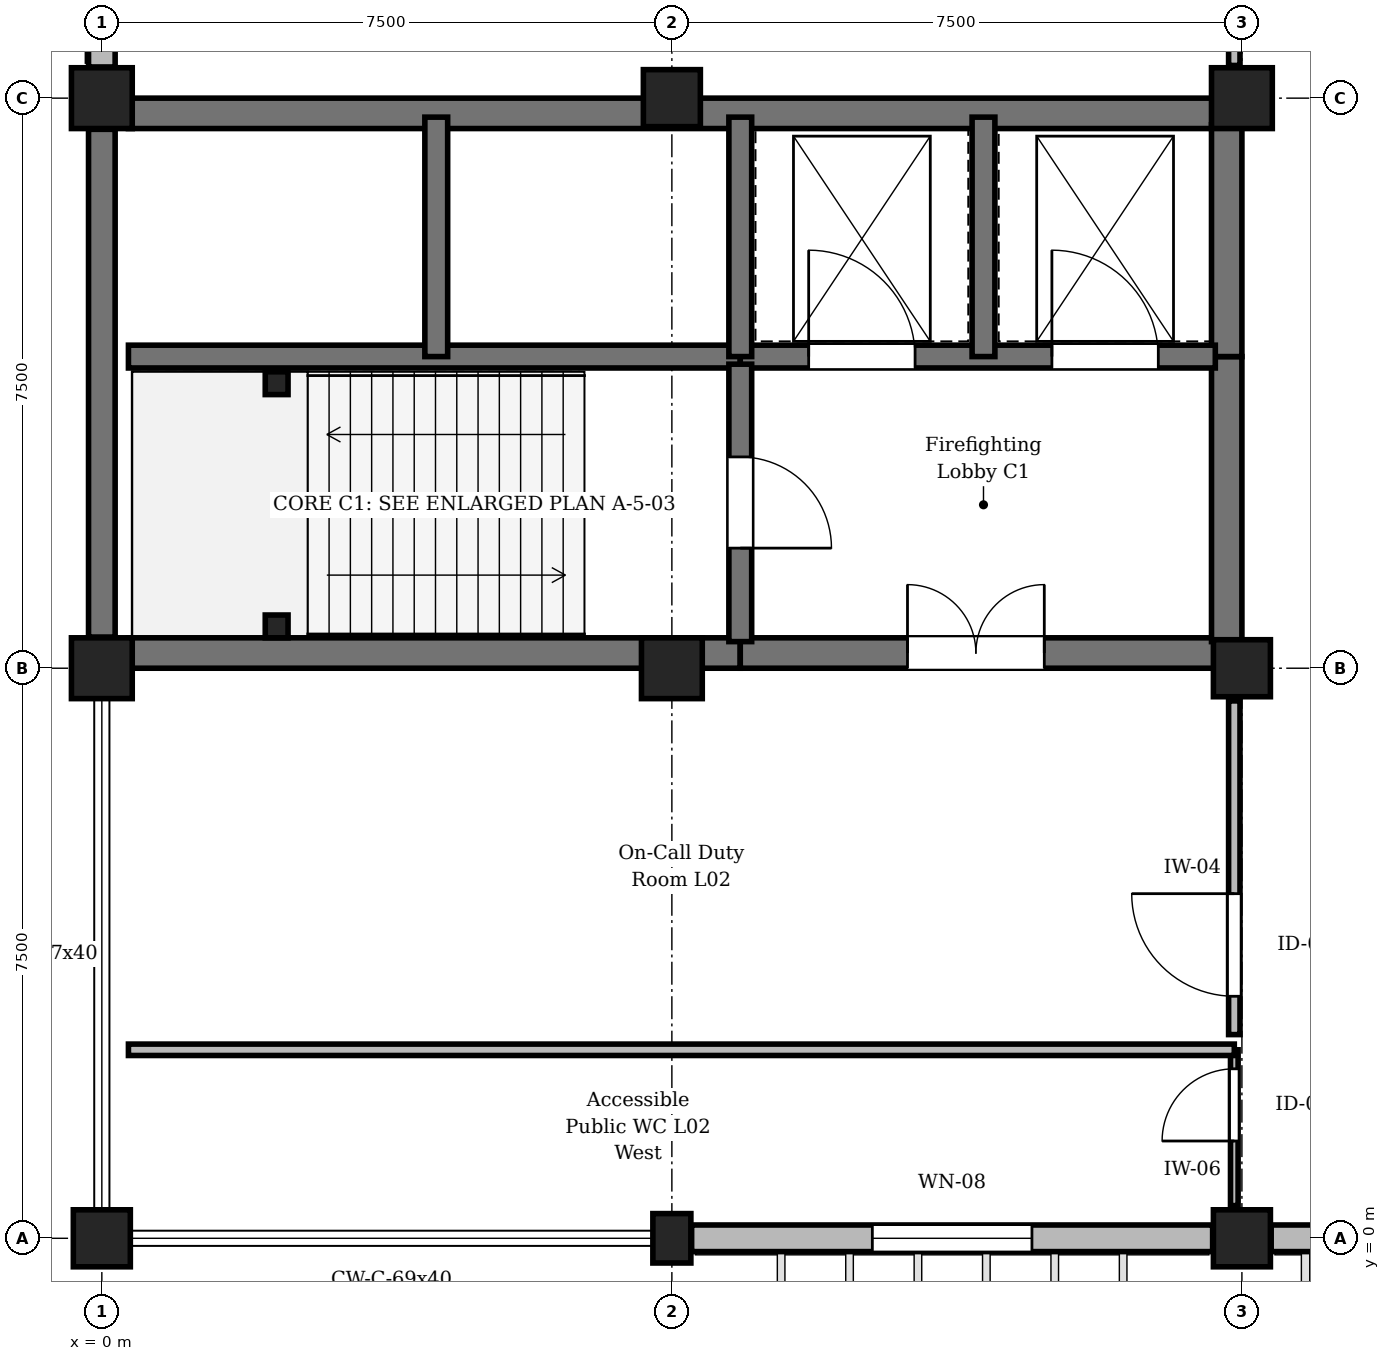
"""IFC4 building model, lengths in metres.
Left out: names, types, materials, properties, quantities, classifications, styles, units other than length and angle.
Written with IfcOpenShell. Run it as: python <this file> out.ifc"""

import sys

from ifc_helpers import new_model, si_unit, direction, frame, frame_2d, origin, origin_with_axes, origin_2d, place, context, subcontext, project, spatial, rectangle, circle, i_section, extrude, element, fill, save


model = new_model("IFC4")
c1 = context("Model", 3, precision=1e-05, world=origin(), true_north=direction((0.0, 1.0)))
c2 = subcontext(c1, "Body", "Model", "MODEL_VIEW")
j1 = project(units=[si_unit("LENGTHUNIT", "METRE"), si_unit("PLANEANGLEUNIT", "RADIAN")], contexts=[c1])
p1 = place(None, origin())
s1 = spatial("IfcSite", under=j1, at=p1, CompositionType="ELEMENT")
p2 = place(p1, origin())
s2 = spatial("IfcBuilding", under=s1, at=p2, CompositionType="ELEMENT")
p3 = place(p2, frame((0.0, 0.0, 9.3)))
s3 = spatial("IfcBuildingStorey", under=s2, at=p3, CompositionType="ELEMENT", Elevation=9.3)
p4 = place(p3, origin_with_axes())
e1 = element("IfcColumn", 1, at=p4, inside=s3, PredefinedType="COLUMN", context=c2, shape_type="SweptSolid", body=[
    extrude(rectangle(XDim=0.75, YDim=0.75, at=origin_2d()), origin(), (0.0, 0.0, 1.0), 4.8),
])
for number, where, z_axis, x_axis in (
    (2, (0.0, 7.5, 0.0), (0.0, 0.0, 1.0), (1.0, 0.0, 0.0)),
    (3, (0.0, 15.0, 0.0), (0.0, 0.0, 1.0), (1.0, 0.0, 0.0)),
):
    element("IfcColumn", number, at=place(p3, frame(where, z_axis=z_axis, x_axis=x_axis)), inside=s3, PredefinedType="COLUMN", context=c2, shape_type="SweptSolid", body=[
        extrude(rectangle(XDim=0.8, YDim=0.8, at=origin_2d()), origin(), (0.0, 0.0, 1.0), 4.8),
    ])
p5 = place(p3, frame((7.5, 0.0, 0.0), z_axis=(0.0, 0.0, 1.0), x_axis=(1.0, 0.0, 0.0)))
e4 = element("IfcColumn", 4, at=p5, inside=s3, PredefinedType="COLUMN", context=c2, shape_type="SweptSolid", body=[
    extrude(rectangle(XDim=0.5, YDim=0.65, at=origin_2d()), origin(), (0.0, 0.0, 1.0), 4.8),
])
p6 = place(p3, frame((7.5, 7.5, 0.0), z_axis=(0.0, 0.0, 1.0), x_axis=(1.0, 0.0, 0.0)))
e5 = element("IfcColumn", 5, at=p6, inside=s3, PredefinedType="COLUMN", context=c2, shape_type="SweptSolid", body=[
    extrude(rectangle(XDim=0.8, YDim=0.8, at=origin_2d()), origin(), (0.0, 0.0, 1.0), 4.8),
])
p7 = place(p3, frame((7.5, 15.0, 0.0), z_axis=(0.0, 0.0, 1.0), x_axis=(1.0, 0.0, 0.0)))
e6 = element("IfcColumn", 6, at=p7, inside=s3, PredefinedType="COLUMN", context=c2, shape_type="SweptSolid", body=[
    extrude(circle(Radius=0.375, at=origin_2d()), origin(), (0.0, 0.0, 1.0), 4.8),
])
p8 = place(p3, frame((15.0, 0.0, 0.0), z_axis=(0.0, 0.0, 1.0), x_axis=(1.0, 0.0, 0.0)))
e7 = element("IfcColumn", 7, at=p8, inside=s3, PredefinedType="COLUMN", context=c2, shape_type="SweptSolid", body=[
    extrude(rectangle(XDim=0.75, YDim=0.75, at=origin_2d()), origin(), (0.0, 0.0, 1.0), 4.8),
])
p9 = place(p3, frame((15.0, 7.5, 0.0), z_axis=(0.0, 0.0, 1.0), x_axis=(1.0, 0.0, 0.0)))
e8 = element("IfcColumn", 8, at=p9, inside=s3, PredefinedType="COLUMN", context=c2, shape_type="SweptSolid", body=[
    extrude(circle(Radius=0.375, at=origin_2d()), origin(), (0.0, 0.0, 1.0), 4.8),
])
p10 = place(p3, frame((15.0, 15.0, 0.0), z_axis=(0.0, 0.0, 1.0), x_axis=(1.0, 0.0, 0.0)))
e9 = element("IfcColumn", 9, at=p10, inside=s3, PredefinedType="COLUMN", context=c2, shape_type="SweptSolid", body=[
    extrude(rectangle(XDim=0.8, YDim=0.8, at=origin_2d()), origin(), (0.0, 0.0, 1.0), 4.8),
])
for number, where, z_axis, x_axis in (
    (10, (2.3, 8.05, 0.0), (0.0, 0.0, 1.0), (1.0, 0.0, 0.0)),
    (11, (2.3, 11.25, 0.0), (0.0, 0.0, 1.0), (1.0, 0.0, 0.0)),
):
    element("IfcColumn", number, at=place(p3, frame(where, z_axis=z_axis, x_axis=x_axis)), inside=s3, PredefinedType="COLUMN", context=c2, shape_type="SweptSolid", body=[
        extrude(i_section(OverallWidth=0.3, OverallDepth=0.3, WebThickness=0.011, FlangeThickness=0.019, FilletRadius=0.027, at=origin_2d()), origin(), (0.0, 0.0, 1.0), 4.8),
    ])
p11 = place(p3, frame((0.0, 7.91, 0.0), z_axis=(0.0, 0.0, 1.0), x_axis=(0.0, 1.0, 0.0)))
e12 = element("IfcWall", 12, at=p11, inside=s3, PredefinedType="SHEAR", context=c2, shape_type="SweptSolid", body=[
    extrude(rectangle(XDim=6.68, YDim=0.35, at=frame_2d((3.34, 0.0))), origin(), (0.0, 0.0, 1.0), 4.55),
])
p12 = place(p3, frame((0.0, 15.41, 0.0), z_axis=(0.0, 0.0, 1.0), x_axis=(0.0, 1.0, 0.0)))
e13 = element("IfcWall", 13, at=p12, inside=s3, PredefinedType="STANDARD", context=c2, shape_type="SweptSolid", body=[
    extrude(rectangle(XDim=6.705, YDim=0.35, at=frame_2d((3.353, 0.0))), origin(), (0.0, 0.0, 1.0), 3.95),
])
p13 = place(p12, frame((2.153, 0.0, 0.9)))
e14 = element("IfcOpeningElement", 14, at=p13, cuts=e13, PredefinedType="OPENING", context=c2, shape_type="SweptSolid", body=[
    extrude(rectangle(XDim=2.4, YDim=2.1, at=frame_2d((1.2, 1.05))), frame((0.0, 0.185, 0.0), z_axis=(0.0, -1.0, 0.0), x_axis=(1.0, 0.0, 0.0)), (0.0, 0.0, 1.0), 0.37),
])
p14 = place(p3, frame((14.615, 0.0, 0.0), z_axis=(0.0, 0.0, 1.0), x_axis=(-1.0, 0.0, 0.0)))
e15 = element("IfcWall", 15, at=p14, inside=s3, PredefinedType="STANDARD", context=c2, shape_type="SweptSolid", body=[
    extrude(rectangle(XDim=6.855, YDim=0.35, at=frame_2d((3.427, 0.0))), origin(), (0.0, 0.0, 1.0), 3.95),
])
p15 = place(p14, frame((2.377, 0.0, 0.9)))
e16 = element("IfcOpeningElement", 16, at=p15, cuts=e15, PredefinedType="OPENING", context=c2, shape_type="SweptSolid", body=[
    extrude(rectangle(XDim=2.1, YDim=2.1, at=frame_2d((1.05, 1.05))), frame((0.0, 0.185, 0.0), z_axis=(0.0, -1.0, 0.0), x_axis=(1.0, 0.0, 0.0)), (0.0, 0.0, 1.0), 0.37),
])
p16 = place(p3, frame((22.24, 0.0, 0.0), z_axis=(0.0, 0.0, 1.0), x_axis=(-1.0, 0.0, 0.0)))
e17 = element("IfcWall", 17, at=p16, inside=s3, PredefinedType="STANDARD", context=c2, shape_type="SweptSolid", body=[
    extrude(rectangle(XDim=6.855, YDim=0.35, at=frame_2d((3.427, 0.0))), origin(), (0.0, 0.0, 1.0), 3.95),
])
p17 = place(p16, frame((2.228, 0.0, 0.9)))
e18 = element("IfcOpeningElement", 18, at=p17, cuts=e17, PredefinedType="OPENING", context=c2, shape_type="SweptSolid", body=[
    extrude(rectangle(XDim=2.4, YDim=2.1, at=frame_2d((1.2, 1.05))), frame((0.0, 0.185, 0.0), z_axis=(0.0, -1.0, 0.0), x_axis=(1.0, 0.0, 0.0)), (0.0, 0.0, 1.0), 0.37),
])
p18 = place(p3, frame((0.35, 7.7, 0.0), z_axis=(0.0, 0.0, 1.0), x_axis=(1.0, 0.0, 0.0)))
e19 = element("IfcWall", 19, at=p18, inside=s3, PredefinedType="SHEAR", context=c2, shape_type="SweptSolid", body=[
    extrude(rectangle(XDim=8.05, YDim=0.4, at=frame_2d((4.025, 0.0))), origin(), (0.0, 0.0, 1.0), 4.55),
])
p19 = place(p3, frame((8.4, 7.7, 0.0), z_axis=(0.0, 0.0, 1.0), x_axis=(1.0, 0.0, 0.0)))
e20 = element("IfcWall", 20, at=p19, inside=s3, PredefinedType="SHEAR", context=c2, shape_type="SweptSolid", body=[
    extrude(rectangle(XDim=6.25, YDim=0.4, at=frame_2d((3.125, 0.0))), origin(), (0.0, 0.0, 1.0), 4.55),
])
p20 = place(p19, frame((2.2, 0.0, 0.0)))
e21 = element("IfcOpeningElement", 21, at=p20, cuts=e20, PredefinedType="OPENING", context=c2, shape_type="SweptSolid", body=[
    extrude(rectangle(XDim=1.8, YDim=2.25, at=frame_2d((0.9, 1.125))), frame((0.0, 0.21, 0.0), z_axis=(0.0, -1.0, 0.0), x_axis=(1.0, 0.0, 0.0)), (0.0, 0.0, 1.0), 0.42),
])
p21 = place(p3, frame((0.35, 14.8, 0.0), z_axis=(0.0, 0.0, 1.0), x_axis=(1.0, 0.0, 0.0)))
e22 = element("IfcWall", 22, at=p21, inside=s3, PredefinedType="SHEAR", context=c2, shape_type="SweptSolid", body=[
    extrude(rectangle(XDim=14.3, YDim=0.4, at=frame_2d((7.15, 0.0))), origin(), (0.0, 0.0, 1.0), 4.55),
])
p22 = place(p3, frame((14.8, 7.85, 0.0), z_axis=(0.0, 0.0, 1.0), x_axis=(0.0, 1.0, 0.0)))
e23 = element("IfcWall", 23, at=p22, inside=s3, PredefinedType="SHEAR", context=c2, shape_type="SweptSolid", body=[
    extrude(rectangle(XDim=3.75, YDim=0.4, at=frame_2d((1.875, 0.0))), origin(), (0.0, 0.0, 1.0), 4.55),
])
p23 = place(p3, frame((14.8, 11.6, 0.0), z_axis=(0.0, 0.0, 1.0), x_axis=(0.0, 1.0, 0.0)))
e24 = element("IfcWall", 24, at=p23, inside=s3, PredefinedType="SHEAR", context=c2, shape_type="SweptSolid", body=[
    extrude(rectangle(XDim=3.05, YDim=0.4, at=frame_2d((1.525, 0.0))), origin(), (0.0, 0.0, 1.0), 4.55),
])
p24 = place(p3, frame((0.35, 11.6, 0.0), z_axis=(0.0, 0.0, 1.0), x_axis=(1.0, 0.0, 0.0)))
e25 = element("IfcWall", 25, at=p24, inside=s3, PredefinedType="SHEAR", context=c2, shape_type="SweptSolid", body=[
    extrude(rectangle(XDim=8.05, YDim=0.3, at=frame_2d((4.025, 0.0))), origin(), (0.0, 0.0, 1.0), 4.55),
])
p25 = place(p3, frame((8.4, 11.6, 0.0), z_axis=(0.0, 0.0, 1.0), x_axis=(1.0, 0.0, 0.0)))
e26 = element("IfcWall", 26, at=p25, inside=s3, PredefinedType="SHEAR", context=c2, shape_type="SweptSolid", body=[
    extrude(rectangle(XDim=6.25, YDim=0.3, at=frame_2d((3.125, 0.0))), origin(), (0.0, 0.0, 1.0), 4.55),
])
p26 = place(p25, frame((0.9, 0.0, 0.0)))
e27 = element("IfcOpeningElement", 27, at=p26, cuts=e26, PredefinedType="OPENING", context=c2, shape_type="SweptSolid", body=[
    extrude(rectangle(XDim=1.4, YDim=2.25, at=frame_2d((0.7, 1.125))), frame((0.0, 0.16, 0.0), z_axis=(0.0, -1.0, 0.0), x_axis=(1.0, 0.0, 0.0)), (0.0, 0.0, 1.0), 0.32),
])
p27 = place(p25, frame((4.1, 0.0, 0.0)))
e28 = element("IfcOpeningElement", 28, at=p27, cuts=e26, PredefinedType="OPENING", context=c2, shape_type="SweptSolid", body=[
    extrude(rectangle(XDim=1.4, YDim=2.25, at=frame_2d((0.7, 1.125))), frame((0.0, 0.16, 0.0), z_axis=(0.0, -1.0, 0.0), x_axis=(1.0, 0.0, 0.0)), (0.0, 0.0, 1.0), 0.32),
])
p28 = place(p3, frame((8.4, 11.5, 0.0), z_axis=(0.0, 0.0, 1.0), x_axis=(0.0, -1.0, 0.0)))
e29 = element("IfcWall", 29, at=p28, inside=s3, PredefinedType="SHEAR", context=c2, shape_type="SweptSolid", body=[
    extrude(rectangle(XDim=3.65, YDim=0.3, at=frame_2d((1.825, 0.0))), origin(), (0.0, 0.0, 1.0), 4.55),
])
p29 = place(p28, frame((1.22, 0.0, 0.0)))
e30 = element("IfcOpeningElement", 30, at=p29, cuts=e29, PredefinedType="OPENING", context=c2, shape_type="SweptSolid", body=[
    extrude(rectangle(XDim=1.2, YDim=2.25, at=frame_2d((0.6, 1.125))), frame((0.0, 0.16, 0.0), z_axis=(0.0, -1.0, 0.0), x_axis=(1.0, 0.0, 0.0)), (0.0, 0.0, 1.0), 0.32),
])
for number, where, z_axis, x_axis in (
    (31, (4.4, 11.6, 0.0), (0.0, 0.0, 1.0), (0.0, 1.0, 0.0)),
    (32, (8.4, 11.6, 0.0), (0.0, 0.0, 1.0), (0.0, 1.0, 0.0)),
    (33, (11.6, 11.6, 0.0), (0.0, 0.0, 1.0), (0.0, 1.0, 0.0)),
):
    element("IfcWall", number, at=place(p3, frame(where, z_axis=z_axis, x_axis=x_axis)), inside=s3, PredefinedType="SHEAR", context=c2, shape_type="SweptSolid", body=[
        extrude(rectangle(XDim=3.15, YDim=0.3, at=frame_2d((1.575, 0.0))), origin(), (0.0, 0.0, 1.0), 4.55),
    ])
p30 = place(p3, frame((14.9, 0.43, 0.0), z_axis=(0.0, 0.0, 1.0), x_axis=(0.0, 1.0, 0.0)))
e34 = element("IfcWall", 34, at=p30, inside=s3, PredefinedType="PARTITIONING", context=c2, shape_type="SweptSolid", body=[
    extrude(rectangle(XDim=2.05, YDim=0.1, at=frame_2d((1.025, 0.0))), origin(), (0.0, 0.0, 1.0), 3.985),
])
p31 = place(p30, frame((0.85, 0.0, 0.0)))
e35 = element("IfcOpeningElement", 35, at=p31, cuts=e34, PredefinedType="OPENING", context=c2, shape_type="SweptSolid", body=[
    extrude(rectangle(XDim=0.95, YDim=2.15, at=frame_2d((0.475, 1.075))), frame((0.0, 0.06, 0.0), z_axis=(0.0, -1.0, 0.0), x_axis=(1.0, 0.0, 0.0)), (0.0, 0.0, 1.0), 0.12),
])
p32 = place(p3, frame((14.9, 2.68, 0.0), z_axis=(0.0, 0.0, 1.0), x_axis=(0.0, 1.0, 0.0)))
e36 = element("IfcWall", 36, at=p32, inside=s3, PredefinedType="PARTITIONING", context=c2, shape_type="SweptSolid", body=[
    extrude(rectangle(XDim=4.39, YDim=0.15, at=frame_2d((2.195, 0.0))), origin(), (0.0, 0.0, 1.0), 3.985),
])
p33 = place(p32, frame((0.504, 0.0, 0.0)))
e37 = element("IfcOpeningElement", 37, at=p33, cuts=e36, PredefinedType="OPENING", context=c2, shape_type="SweptSolid", body=[
    extrude(rectangle(XDim=1.35, YDim=2.25, at=frame_2d((0.675, 1.125))), frame((0.0, 0.085, 0.0), z_axis=(0.0, -1.0, 0.0), x_axis=(1.0, 0.0, 0.0)), (0.0, 0.0, 1.0), 0.17),
])
p34 = place(p3, frame((14.9, 15.43, 0.0), z_axis=(0.0, 0.0, 1.0), x_axis=(0.0, 1.0, 0.0)))
e38 = element("IfcWall", 38, at=p34, inside=s3, PredefinedType="PARTITIONING", context=c2, shape_type="SweptSolid", body=[
    extrude(rectangle(XDim=7.5, YDim=0.15, at=frame_2d((3.75, 0.0))), origin(), (0.0, 0.0, 1.0), 3.835),
])
p35 = place(p34, frame((2.47, 0.0, 0.0)))
e39 = element("IfcOpeningElement", 39, at=p35, cuts=e38, PredefinedType="OPENING", context=c2, shape_type="SweptSolid", body=[
    extrude(rectangle(XDim=1.45, YDim=2.3, at=frame_2d((0.725, 1.15))), frame((0.0, 0.085, 0.0), z_axis=(0.0, -1.0, 0.0), x_axis=(1.0, 0.0, 0.0)), (0.0, 0.0, 1.0), 0.17),
])
p36 = place(p3, frame((0.35, 2.48, 0.0), z_axis=(0.0, 0.0, 1.0), x_axis=(1.0, 0.0, 0.0)))
e40 = element("IfcWall", 40, at=p36, inside=s3, PredefinedType="PARTITIONING", context=c2, shape_type="SweptSolid", body=[
    extrude(rectangle(XDim=14.55, YDim=0.15, at=frame_2d((7.275, 0.0))), origin(), (0.0, 0.0, 1.0), 4.535),
])
p37 = place(p15, origin())
e41 = element("IfcWindow", 41, at=p37, inside=s3, PartitioningType="SINGLE_PANEL", PredefinedType="WINDOW", context=c2, shape_type="SweptSolid", body=[
    extrude(rectangle(XDim=2.1, YDim=2.1, at=frame_2d((1.05, 1.05))), frame((0.0, 0.03, 0.0), z_axis=(0.0, -1.0, 0.0), x_axis=(1.0, 0.0, 0.0)), (0.0, 0.0, 1.0), 0.06),
])
fill(e16, e41)
p38 = place(p20, origin())
e42 = element("IfcDoor", 42, at=p38, inside=s3, OperationType="DOUBLE_DOOR_SINGLE_SWING", PredefinedType="DOOR", context=c2, shape_type="SweptSolid", body=[
    extrude(rectangle(XDim=1.8, YDim=2.25, at=frame_2d((0.9, 1.125))), frame((0.0, 0.025, 0.0), z_axis=(0.0, -1.0, 0.0), x_axis=(1.0, 0.0, 0.0)), (0.0, 0.0, 1.0), 0.05),
])
fill(e21, e42)
p39 = place(p26, origin())
e43 = element("IfcDoor", 43, at=p39, inside=s3, OperationType="DOUBLE_DOOR_SLIDING", PredefinedType="DOOR", context=c2, shape_type="SweptSolid", body=[
    extrude(rectangle(XDim=1.4, YDim=2.25, at=frame_2d((0.7, 1.125))), frame((0.0, 0.025, 0.0), z_axis=(0.0, -1.0, 0.0), x_axis=(1.0, 0.0, 0.0)), (0.0, 0.0, 1.0), 0.05),
])
fill(e27, e43)
p40 = place(p27, origin())
e44 = element("IfcDoor", 44, at=p40, inside=s3, OperationType="DOUBLE_DOOR_SLIDING", PredefinedType="DOOR", context=c2, shape_type="SweptSolid", body=[
    extrude(rectangle(XDim=1.4, YDim=2.25, at=frame_2d((0.7, 1.125))), frame((0.0, 0.025, 0.0), z_axis=(0.0, -1.0, 0.0), x_axis=(1.0, 0.0, 0.0)), (0.0, 0.0, 1.0), 0.05),
])
fill(e28, e44)
p41 = place(p29, origin())
e45 = element("IfcDoor", 45, at=p41, inside=s3, OperationType="SINGLE_SWING_RIGHT", PredefinedType="DOOR", context=c2, shape_type="SweptSolid", body=[
    extrude(rectangle(XDim=1.2, YDim=2.25, at=frame_2d((0.6, 1.125))), frame((0.0, 0.025, 0.0), z_axis=(0.0, -1.0, 0.0), x_axis=(1.0, 0.0, 0.0)), (0.0, 0.0, 1.0), 0.05),
])
fill(e30, e45)
p42 = place(p31, origin())
e46 = element("IfcDoor", 46, at=p42, inside=s3, OperationType="SINGLE_SWING_LEFT", PredefinedType="DOOR", context=c2, shape_type="SweptSolid", body=[
    extrude(rectangle(XDim=0.95, YDim=2.15, at=frame_2d((0.475, 1.075))), frame((0.0, 0.025, 0.0), z_axis=(0.0, -1.0, 0.0), x_axis=(1.0, 0.0, 0.0)), (0.0, 0.0, 1.0), 0.05),
])
fill(e35, e46)
p43 = place(p33, origin())
e47 = element("IfcDoor", 47, at=p43, inside=s3, OperationType="SINGLE_SWING_RIGHT", PredefinedType="DOOR", context=c2, shape_type="SweptSolid", body=[
    extrude(rectangle(XDim=1.35, YDim=2.25, at=frame_2d((0.675, 1.125))), frame((0.0, 0.025, 0.0), z_axis=(0.0, -1.0, 0.0), x_axis=(1.0, 0.0, 0.0)), (0.0, 0.0, 1.0), 0.05),
])
fill(e37, e47)
save(model, sys.argv[1])
